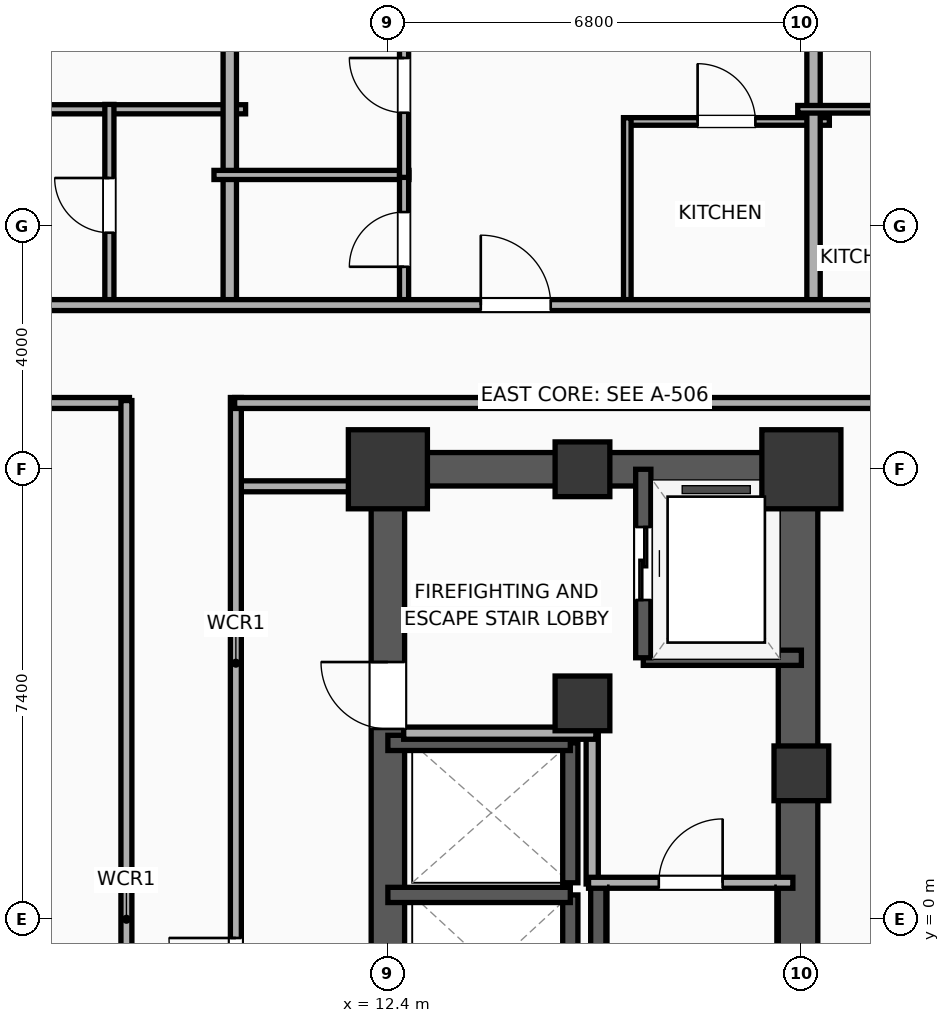
"""IFC4 building model, lengths in metres.
Left out: names, types, materials, properties, quantities, classifications, styles, units other than length and angle.
Written with IfcOpenShell. Run it as: python <this file> out.ifc"""

import sys

from ifc_helpers import new_model, si_unit, direction, frame, frame_2d, origin, origin_2d, place, context, subcontext, project, spatial, rectangle, extrude, element, fill, save


model = new_model("IFC4")
c1 = context("Model", 3, precision=1e-05, world=origin(), true_north=direction((0.0, 1.0)))
c2 = subcontext(c1, "Body", "Model", "MODEL_VIEW")
j1 = project(units=[si_unit("LENGTHUNIT", "METRE"), si_unit("PLANEANGLEUNIT", "RADIAN")], contexts=[c1])
p1 = place(None, origin())
s1 = spatial("IfcSite", under=j1, at=p1, CompositionType="ELEMENT")
p2 = place(p1, origin())
s2 = spatial("IfcBuilding", under=s1, at=p2, CompositionType="ELEMENT")
p3 = place(p2, frame((0.0, 0.0, 105.3)))
s3 = spatial("IfcBuildingStorey", under=s2, at=p3, CompositionType="ELEMENT", Elevation=105.3)
p4 = place(p3, frame((15.6, 3.55, 0.0), z_axis=(0.0, 0.0, 1.0), x_axis=(1.0, 0.0, 0.0)))
e1 = element("IfcColumn", 1, at=p4, inside=s3, PredefinedType="COLUMN", context=c2, shape_type="SweptSolid", body=[
    extrude(rectangle(XDim=0.9, YDim=0.9, at=origin_2d()), origin(), (0.0, 0.0, 1.0), 3.9),
])
p5 = place(p3, frame((12.4, 7.4, 0.0), z_axis=(0.0, 0.0, 1.0), x_axis=(1.0, 0.0, 0.0)))
e2 = element("IfcColumn", 2, at=p5, inside=s3, PredefinedType="COLUMN", context=c2, shape_type="SweptSolid", body=[
    extrude(rectangle(XDim=1.3, YDim=1.3, at=origin_2d()), origin(), (0.0, 0.0, 1.0), 3.9),
])
for number, where, z_axis, x_axis in (
    (3, (15.6, 7.4, 0.0), (0.0, 0.0, 1.0), (1.0, 0.0, 0.0)),
    (4, (19.2, 2.4, 0.0), (0.0, 0.0, 1.0), (1.0, 0.0, 0.0)),
):
    element("IfcColumn", number, at=place(p3, frame(where, z_axis=z_axis, x_axis=x_axis)), inside=s3, PredefinedType="COLUMN", context=c2, shape_type="SweptSolid", body=[
        extrude(rectangle(XDim=0.9, YDim=0.9, at=origin_2d()), origin(), (0.0, 0.0, 1.0), 3.9),
    ])
p6 = place(p3, frame((19.2, 7.4, 0.0), z_axis=(0.0, 0.0, 1.0), x_axis=(1.0, 0.0, 0.0)))
e5 = element("IfcColumn", 5, at=p6, inside=s3, PredefinedType="COLUMN", context=c2, shape_type="SweptSolid", body=[
    extrude(rectangle(XDim=1.3, YDim=1.3, at=origin_2d()), origin(), (0.0, 0.0, 1.0), 3.9),
])
p7 = place(p3, frame((12.125, 7.4, 0.0), z_axis=(0.0, 0.0, 1.0), x_axis=(1.0, 0.0, 0.0)))
e6 = element("IfcWall", 6, at=p7, inside=s3, PredefinedType="SHEAR", context=c2, shape_type="SweptSolid", body=[
    extrude(rectangle(XDim=7.35, YDim=0.55, at=frame_2d((3.675, 0.0))), origin(), (0.0, 0.0, 1.0), 3.65),
])
p8 = place(p3, frame((12.4, -7.4, 0.0), z_axis=(0.0, 0.0, 1.0), x_axis=(0.0, 1.0, 0.0)))
e7 = element("IfcWall", 7, at=p8, inside=s3, PredefinedType="SHEAR", context=c2, shape_type="SweptSolid", body=[
    extrude(rectangle(XDim=14.8, YDim=0.55, at=frame_2d((7.4, 0.0))), origin(), (0.0, 0.0, 1.0), 3.65),
])
p9 = place(p8, frame((0.85, 0.0, 0.0)))
e8 = element("IfcOpeningElement", 8, at=p9, cuts=e7, PredefinedType="OPENING", context=c2, shape_type="SweptSolid", body=[
    extrude(rectangle(XDim=1.1, YDim=2.05, at=frame_2d((0.55, 1.025))), frame((0.0, 0.285, 0.0), z_axis=(0.0, -1.0, 0.0), x_axis=(1.0, 0.0, 0.0)), (0.0, 0.0, 1.0), 0.57),
])
p10 = place(p8, frame((10.53, 0.0, 0.0)))
e9 = element("IfcOpeningElement", 9, at=p10, cuts=e7, PredefinedType="OPENING", context=c2, shape_type="SweptSolid", body=[
    extrude(rectangle(XDim=1.1, YDim=2.05, at=frame_2d((0.55, 1.025))), frame((0.0, 0.285, 0.0), z_axis=(0.0, -1.0, 0.0), x_axis=(1.0, 0.0, 0.0)), (0.0, 0.0, 1.0), 0.57),
])
p11 = place(p3, frame((19.145, -7.4, 0.0), z_axis=(0.0, 0.0, 1.0), x_axis=(0.0, 1.0, 0.0)))
e10 = element("IfcWall", 10, at=p11, inside=s3, PredefinedType="SHEAR", context=c2, shape_type="SweptSolid", body=[
    extrude(rectangle(XDim=14.8, YDim=0.65, at=frame_2d((7.4, 0.0))), origin(), (0.0, 0.0, 1.0), 3.65),
])
p12 = place(p3, frame((15.86, -7.085, 0.0), z_axis=(0.0, 0.0, 1.0), x_axis=(0.0, 1.0, 0.0)))
e11 = element("IfcWall", 11, at=p12, inside=s3, PredefinedType="SOLIDWALL", context=c2, shape_type="SweptSolid", body=[
    extrude(rectangle(XDim=7.685, YDim=0.25, at=frame_2d((3.843, 0.0))), origin(), (0.0, 0.0, 1.0), 3.65),
])
p13 = place(p3, frame((16.6, 4.3, 0.0), z_axis=(0.0, 0.0, 1.0), x_axis=(1.0, 0.0, 0.0)))
e12 = element("IfcWall", 12, at=p13, inside=s3, PredefinedType="SOLIDWALL", context=c2, shape_type="SweptSolid", body=[
    extrude(rectangle(XDim=2.6, YDim=0.25, at=frame_2d((1.3, 0.0))), origin(), (0.0, 0.0, 1.0), 3.65),
])
p14 = place(p3, frame((16.6, 7.4, 0.0), z_axis=(0.0, 0.0, 1.0), x_axis=(0.0, -1.0, 0.0)))
e13 = element("IfcWall", 13, at=p14, inside=s3, PredefinedType="SOLIDWALL", context=c2, shape_type="SweptSolid", body=[
    extrude(rectangle(XDim=3.1, YDim=0.25, at=frame_2d((1.55, 0.0))), origin(), (0.0, 0.0, 1.0), 3.65),
])
p15 = place(p14, frame((0.95, 0.0, 0.0)))
e14 = element("IfcOpeningElement", 14, at=p15, cuts=e13, PredefinedType="OPENING", context=c2, shape_type="SweptSolid", body=[
    extrude(rectangle(XDim=1.2, YDim=2.05, at=frame_2d((0.6, 1.025))), frame((0.0, 0.135, 0.0), z_axis=(0.0, -1.0, 0.0), x_axis=(1.0, 0.0, 0.0)), (0.0, 0.0, 1.0), 0.27),
])
p16 = place(p3, frame((15.4, -2.0, 0.0), z_axis=(0.0, 0.0, 1.0), x_axis=(0.0, 1.0, 0.0)))
e15 = element("IfcWall", 15, at=p16, inside=s3, PredefinedType="SOLIDWALL", context=c2, shape_type="SweptSolid", body=[
    extrude(rectangle(XDim=2.4, YDim=0.25, at=frame_2d((1.2, 0.0))), origin(), (0.0, 0.0, 1.0), 3.65),
])
p17 = place(p3, frame((15.4, 0.4, 0.0), z_axis=(0.0, 0.0, 1.0), x_axis=(-1.0, 0.0, 0.0)))
e16 = element("IfcWall", 16, at=p17, inside=s3, PredefinedType="SOLIDWALL", context=c2, shape_type="SweptSolid", body=[
    extrude(rectangle(XDim=3.0, YDim=0.25, at=frame_2d((1.5, 0.0))), origin(), (0.0, 0.0, 1.0), 3.65),
])
p18 = place(p3, frame((15.4, 0.6, 0.0), z_axis=(0.0, 0.0, 1.0), x_axis=(0.0, 1.0, 0.0)))
e17 = element("IfcWall", 17, at=p18, inside=s3, PredefinedType="SOLIDWALL", context=c2, shape_type="SweptSolid", body=[
    extrude(rectangle(XDim=2.3, YDim=0.25, at=frame_2d((1.15, 0.0))), origin(), (0.0, 0.0, 1.0), 3.65),
])
p19 = place(p3, frame((15.4, 2.9, 0.0), z_axis=(0.0, 0.0, 1.0), x_axis=(-1.0, 0.0, 0.0)))
e18 = element("IfcWall", 18, at=p19, inside=s3, PredefinedType="SOLIDWALL", context=c2, shape_type="SweptSolid", body=[
    extrude(rectangle(XDim=3.0, YDim=0.25, at=frame_2d((1.5, 0.0))), origin(), (0.0, 0.0, 1.0), 3.65),
])
p20 = place(p3, frame((15.76, 0.58, 0.0), z_axis=(0.0, 0.0, 1.0), x_axis=(0.0, 1.0, 0.0)))
e19 = element("IfcWall", 19, at=p20, inside=s3, PredefinedType="PARTITIONING", context=c2, shape_type="SweptSolid", body=[
    extrude(rectangle(XDim=2.52, YDim=0.2, at=frame_2d((1.26, 0.0))), origin(), (0.0, 0.0, 1.0), 3.65),
])
p21 = place(p3, frame((12.66, 3.06, 0.0), z_axis=(0.0, 0.0, 1.0), x_axis=(1.0, 0.0, 0.0)))
e20 = element("IfcWall", 20, at=p21, inside=s3, PredefinedType="PARTITIONING", context=c2, shape_type="SweptSolid", body=[
    extrude(rectangle(XDim=3.16, YDim=0.2, at=frame_2d((1.58, 0.0))), origin(), (0.0, 0.0, 1.0), 3.65),
])
p22 = place(p3, frame((15.7, 0.6, 0.0), z_axis=(0.0, 0.0, 1.0), x_axis=(1.0, 0.0, 0.0)))
e21 = element("IfcWall", 21, at=p22, inside=s3, PredefinedType="PARTITIONING", context=c2, shape_type="SweptSolid", body=[
    extrude(rectangle(XDim=3.36, YDim=0.18, at=frame_2d((1.68, 0.0))), origin(), (0.0, 0.0, 1.0), 3.65),
])
p23 = place(p22, frame((1.155, 0.0, 0.0)))
e22 = element("IfcOpeningElement", 22, at=p23, cuts=e21, PredefinedType="OPENING", context=c2, shape_type="SweptSolid", body=[
    extrude(rectangle(XDim=1.05, YDim=2.05, at=frame_2d((0.525, 1.025))), frame((0.0, 0.1, 0.0), z_axis=(0.0, -1.0, 0.0), x_axis=(1.0, 0.0, 0.0)), (0.0, 0.0, 1.0), 0.2),
])
p24 = place(p3, frame((9.88, 7.12, 0.0), z_axis=(0.0, 0.0, 1.0), x_axis=(1.0, 0.0, 0.0)))
e23 = element("IfcWall", 23, at=p24, inside=s3, PredefinedType="PARTITIONING", context=c2, shape_type="SweptSolid", body=[
    extrude(rectangle(XDim=2.27, YDim=0.18, at=frame_2d((1.135, 0.0))), origin(), (0.0, 0.0, 1.0), 3.65),
])
p25 = place(p3, frame((9.9, -8.58, 0.0), z_axis=(0.0, 0.0, 1.0), x_axis=(0.0, 1.0, 0.0)))
e24 = element("IfcWall", 24, at=p25, inside=s3, PredefinedType="PARTITIONING", context=c2, shape_type="SweptSolid", body=[
    extrude(rectangle(XDim=17.16, YDim=0.18, at=frame_2d((8.58, 0.0))), origin(), (0.0, 0.0, 1.0), 3.65),
])
p26 = place(p25, frame((7.172, 0.0, 0.0)))
e25 = element("IfcOpeningElement", 25, at=p26, cuts=e24, PredefinedType="OPENING", context=c2, shape_type="SweptSolid", body=[
    extrude(rectangle(XDim=1.1, YDim=2.05, at=frame_2d((0.55, 1.025))), frame((0.0, 0.1, 0.0), z_axis=(0.0, -1.0, 0.0), x_axis=(1.0, 0.0, 0.0)), (0.0, 0.0, 1.0), 0.2),
])
p27 = place(p3, frame((9.88, 8.49, 0.0), z_axis=(0.0, 0.0, 1.0), x_axis=(1.0, 0.0, 0.0)))
e26 = element("IfcWall", 26, at=p27, inside=s3, PredefinedType="PARTITIONING", context=c2, shape_type="SweptSolid", body=[
    extrude(rectangle(XDim=23.33, YDim=0.18, at=frame_2d((11.665, 0.0))), origin(), (0.0, 0.0, 1.0), 3.65),
])
p28 = place(p27, frame((18.115, 0.0, 0.0)))
e27 = element("IfcOpeningElement", 27, at=p28, cuts=e26, PredefinedType="OPENING", context=c2, shape_type="SweptSolid", body=[
    extrude(rectangle(XDim=1.15, YDim=2.05, at=frame_2d((0.575, 1.025))), frame((0.0, 0.1, 0.0), z_axis=(0.0, -1.0, 0.0), x_axis=(1.0, 0.0, 0.0)), (0.0, 0.0, 1.0), 0.2),
])
p29 = place(p3, frame((-8.15, 8.49, 0.0), z_axis=(0.0, 0.0, 1.0), x_axis=(1.0, 0.0, 0.0)))
e28 = element("IfcWall", 28, at=p29, inside=s3, PredefinedType="PARTITIONING", context=c2, shape_type="SweptSolid", body=[
    extrude(rectangle(XDim=16.3, YDim=0.18, at=frame_2d((8.15, 0.0))), origin(), (0.0, 0.0, 1.0), 3.65),
])
p30 = place(p29, frame((8.49, 0.0, 0.0)))
e29 = element("IfcOpeningElement", 29, at=p30, cuts=e28, PredefinedType="OPENING", context=c2, shape_type="SweptSolid", body=[
    extrude(rectangle(XDim=0.95, YDim=2.05, at=frame_2d((0.475, 1.025))), frame((0.0, 0.1, 0.0), z_axis=(0.0, -1.0, 0.0), x_axis=(1.0, 0.0, 0.0)), (0.0, 0.0, 1.0), 0.2),
])
p31 = place(p3, frame((8.1, -8.53, 0.0), z_axis=(0.0, 0.0, 1.0), x_axis=(0.0, 1.0, 0.0)))
e30 = element("IfcWall", 30, at=p31, inside=s3, PredefinedType="PARTITIONING", context=c2, shape_type="SweptSolid", body=[
    extrude(rectangle(XDim=17.06, YDim=0.18, at=frame_2d((8.53, 0.0))), origin(), (0.0, 0.0, 1.0), 3.65),
])
p32 = place(p3, frame((6.27, 13.32, 0.0), z_axis=(0.0, 0.0, 1.0), x_axis=(1.0, 0.0, 0.0)))
e31 = element("IfcWall", 31, at=p32, inside=s3, PredefinedType="PLUMBINGWALL", context=c2, shape_type="SweptSolid", body=[
    extrude(rectangle(XDim=3.79, YDim=0.15, at=frame_2d((1.895, 0.0))), origin(), (0.0, 0.0, 1.0), 3.65),
])
p33 = place(p3, frame((7.82, 10.08, 0.0), z_axis=(0.0, 0.0, 1.0), x_axis=(0.0, 1.0, 0.0)))
e32 = element("IfcWall", 32, at=p33, inside=s3, PredefinedType="PLUMBINGWALL", context=c2, shape_type="SweptSolid", body=[
    extrude(rectangle(XDim=3.32, YDim=0.15, at=frame_2d((1.66, 0.0))), origin(), (0.0, 0.0, 1.0), 3.65),
])
p34 = place(p33, frame((1.21, 0.0, 0.0)))
e33 = element("IfcOpeningElement", 33, at=p34, cuts=e32, PredefinedType="OPENING", context=c2, shape_type="SweptSolid", body=[
    extrude(rectangle(XDim=0.9, YDim=2.05, at=frame_2d((0.45, 1.025))), frame((0.0, 0.085, 0.0), z_axis=(0.0, -1.0, 0.0), x_axis=(1.0, 0.0, 0.0)), (0.0, 0.0, 1.0), 0.17),
])
p35 = place(p3, frame((9.8, 10.02, 0.0), z_axis=(0.0, 0.0, 1.0), x_axis=(0.0, 1.0, 0.0)))
e34 = element("IfcWall", 34, at=p35, inside=s3, PredefinedType="PARTITIONING", context=c2, shape_type="SweptSolid", body=[
    extrude(rectangle(XDim=11.59, YDim=0.22, at=frame_2d((5.795, 0.0))), origin(), (0.0, 0.0, 1.0), 3.65),
])
p36 = place(p3, frame((9.54, 12.24, 0.0), z_axis=(0.0, 0.0, 1.0), x_axis=(1.0, 0.0, 0.0)))
e35 = element("IfcWall", 35, at=p36, inside=s3, PredefinedType="PLUMBINGWALL", context=c2, shape_type="SweptSolid", body=[
    extrude(rectangle(XDim=3.206, YDim=0.15, at=frame_2d((1.603, 0.0))), origin(), (0.0, 0.0, 1.0), 3.65),
])
p37 = place(p3, frame((12.666, 10.08, 0.0), z_axis=(0.0, 0.0, 1.0), x_axis=(0.0, 1.0, 0.0)))
e36 = element("IfcWall", 36, at=p37, inside=s3, PredefinedType="PLUMBINGWALL", context=c2, shape_type="SweptSolid", body=[
    extrude(rectangle(XDim=2.2, YDim=0.15, at=frame_2d((1.1, 0.0))), origin(), (0.0, 0.0, 1.0), 3.65),
])
p38 = place(p37, frame((0.65, 0.0, 0.0)))
e37 = element("IfcOpeningElement", 37, at=p38, cuts=e36, PredefinedType="OPENING", context=c2, shape_type="SweptSolid", body=[
    extrude(rectangle(XDim=0.9, YDim=2.05, at=frame_2d((0.45, 1.025))), frame((0.0, 0.085, 0.0), z_axis=(0.0, -1.0, 0.0), x_axis=(1.0, 0.0, 0.0)), (0.0, 0.0, 1.0), 0.17),
])
p39 = place(p3, frame((12.666, 12.2, 0.0), z_axis=(0.0, 0.0, 1.0), x_axis=(0.0, 1.0, 0.0)))
e38 = element("IfcWall", 38, at=p39, inside=s3, PredefinedType="PLUMBINGWALL", context=c2, shape_type="SweptSolid", body=[
    extrude(rectangle(XDim=9.458, YDim=0.15, at=frame_2d((4.729, 0.0))), origin(), (0.0, 0.0, 1.0), 3.65),
])
p40 = place(p39, frame((1.063, 0.0, 0.0)))
e39 = element("IfcOpeningElement", 39, at=p40, cuts=e38, PredefinedType="OPENING", context=c2, shape_type="SweptSolid", body=[
    extrude(rectangle(XDim=0.9, YDim=2.05, at=frame_2d((0.45, 1.025))), frame((0.0, 0.085, 0.0), z_axis=(0.0, -1.0, 0.0), x_axis=(1.0, 0.0, 0.0)), (0.0, 0.0, 1.0), 0.17),
])
p41 = place(p3, frame((16.277, 13.12, 0.0), z_axis=(0.0, 0.0, 1.0), x_axis=(1.0, 0.0, 0.0)))
e40 = element("IfcWall", 40, at=p41, inside=s3, PredefinedType="PARTITIONING", context=c2, shape_type="SweptSolid", body=[
    extrude(rectangle(XDim=3.383, YDim=0.125, at=frame_2d((1.691, 0.0))), origin(), (0.0, 0.0, 1.0), 3.65),
])
p42 = place(p41, frame((1.217, 0.0, 0.0)))
e41 = element("IfcOpeningElement", 41, at=p42, cuts=e40, PredefinedType="OPENING", context=c2, shape_type="SweptSolid", body=[
    extrude(rectangle(XDim=0.95, YDim=2.05, at=frame_2d((0.475, 1.025))), frame((0.0, 0.073, 0.0), z_axis=(0.0, -1.0, 0.0), x_axis=(1.0, 0.0, 0.0)), (0.0, 0.0, 1.0), 0.145),
])
p43 = place(p3, frame((16.337, 10.08, 0.0), z_axis=(0.0, 0.0, 1.0), x_axis=(0.0, 1.0, 0.0)))
e42 = element("IfcWall", 42, at=p43, inside=s3, PredefinedType="PARTITIONING", context=c2, shape_type="SweptSolid", body=[
    extrude(rectangle(XDim=3.1, YDim=0.125, at=frame_2d((1.55, 0.0))), origin(), (0.0, 0.0, 1.0), 3.65),
])
p44 = place(p3, frame((19.4, 10.02, 0.0), z_axis=(0.0, 0.0, 1.0), x_axis=(0.0, 1.0, 0.0)))
e43 = element("IfcWall", 43, at=p44, inside=s3, PredefinedType="PARTITIONING", context=c2, shape_type="SweptSolid", body=[
    extrude(rectangle(XDim=11.59, YDim=0.22, at=frame_2d((5.795, 0.0))), origin(), (0.0, 0.0, 1.0), 3.65),
])
p45 = place(p3, frame((19.14, 13.32, 0.0), z_axis=(0.0, 0.0, 1.0), x_axis=(1.0, 0.0, 0.0)))
e44 = element("IfcWall", 44, at=p45, inside=s3, PredefinedType="PARTITIONING", context=c2, shape_type="SweptSolid", body=[
    extrude(rectangle(XDim=2.69, YDim=0.125, at=frame_2d((1.345, 0.0))), origin(), (0.0, 0.0, 1.0), 3.65),
])
p46 = place(p3, frame((-29.21, 10.1, 0.0), z_axis=(0.0, 0.0, 1.0), x_axis=(1.0, 0.0, 0.0)))
e45 = element("IfcWall", 45, at=p46, inside=s3, PredefinedType="PARTITIONING", context=c2, shape_type="SweptSolid", body=[
    extrude(rectangle(XDim=62.42, YDim=0.18, at=frame_2d((31.21, 0.0))), origin(), (0.0, 0.0, 1.0), 3.65),
])
p47 = place(p46, frame((4.906, 0.0, 0.0)))
e46 = element("IfcOpeningElement", 46, at=p47, cuts=e45, PredefinedType="OPENING", context=c2, shape_type="SweptSolid", body=[
    extrude(rectangle(XDim=1.15, YDim=2.05, at=frame_2d((0.575, 1.025))), frame((0.0, 0.1, 0.0), z_axis=(0.0, -1.0, 0.0), x_axis=(1.0, 0.0, 0.0)), (0.0, 0.0, 1.0), 0.2),
])
p48 = place(p46, frame((14.812, 0.0, 0.0)))
e47 = element("IfcOpeningElement", 47, at=p48, cuts=e45, PredefinedType="OPENING", context=c2, shape_type="SweptSolid", body=[
    extrude(rectangle(XDim=1.15, YDim=2.05, at=frame_2d((0.575, 1.025))), frame((0.0, 0.1, 0.0), z_axis=(0.0, -1.0, 0.0), x_axis=(1.0, 0.0, 0.0)), (0.0, 0.0, 1.0), 0.2),
])
p49 = place(p46, frame((24.406, 0.0, 0.0)))
e48 = element("IfcOpeningElement", 48, at=p49, cuts=e45, PredefinedType="OPENING", context=c2, shape_type="SweptSolid", body=[
    extrude(rectangle(XDim=1.15, YDim=2.05, at=frame_2d((0.575, 1.025))), frame((0.0, 0.1, 0.0), z_axis=(0.0, -1.0, 0.0), x_axis=(1.0, 0.0, 0.0)), (0.0, 0.0, 1.0), 0.2),
])
p50 = place(p46, frame((33.981, 0.0, 0.0)))
e49 = element("IfcOpeningElement", 49, at=p50, cuts=e45, PredefinedType="OPENING", context=c2, shape_type="SweptSolid", body=[
    extrude(rectangle(XDim=1.15, YDim=2.05, at=frame_2d((0.575, 1.025))), frame((0.0, 0.1, 0.0), z_axis=(0.0, -1.0, 0.0), x_axis=(1.0, 0.0, 0.0)), (0.0, 0.0, 1.0), 0.2),
])
p51 = place(p46, frame((43.138, 0.0, 0.0)))
e50 = element("IfcOpeningElement", 50, at=p51, cuts=e45, PredefinedType="OPENING", context=c2, shape_type="SweptSolid", body=[
    extrude(rectangle(XDim=1.15, YDim=2.05, at=frame_2d((0.575, 1.025))), frame((0.0, 0.1, 0.0), z_axis=(0.0, -1.0, 0.0), x_axis=(1.0, 0.0, 0.0)), (0.0, 0.0, 1.0), 0.2),
])
p52 = place(p46, frame((51.777, 0.0, 0.0)))
e51 = element("IfcOpeningElement", 51, at=p52, cuts=e45, PredefinedType="OPENING", context=c2, shape_type="SweptSolid", body=[
    extrude(rectangle(XDim=0.9, YDim=2.05, at=frame_2d((0.45, 1.025))), frame((0.0, 0.1, 0.0), z_axis=(0.0, -1.0, 0.0), x_axis=(1.0, 0.0, 0.0)), (0.0, 0.0, 1.0), 0.2),
])
p53 = place(p46, frame((58.718, 0.0, 0.0)))
e52 = element("IfcOpeningElement", 52, at=p53, cuts=e45, PredefinedType="OPENING", context=c2, shape_type="SweptSolid", body=[
    extrude(rectangle(XDim=0.9, YDim=2.05, at=frame_2d((0.45, 1.025))), frame((0.0, 0.1, 0.0), z_axis=(0.0, -1.0, 0.0), x_axis=(1.0, 0.0, 0.0)), (0.0, 0.0, 1.0), 0.2),
])
p54 = place(p15, origin())
e53 = element("IfcDoor", 53, at=p54, inside=s3, OperationType="SLIDING_TO_LEFT", PredefinedType="DOOR", context=c2, shape_type="SweptSolid", body=[
    extrude(rectangle(XDim=1.2, YDim=2.05, at=frame_2d((0.6, 1.025))), frame((0.0, 0.025, 0.0), z_axis=(0.0, -1.0, 0.0), x_axis=(1.0, 0.0, 0.0)), (0.0, 0.0, 1.0), 0.05),
])
fill(e14, e53)
p55 = place(p23, origin())
e54 = element("IfcDoor", 54, at=p55, inside=s3, OperationType="SINGLE_SWING_RIGHT", PredefinedType="DOOR", context=c2, shape_type="SweptSolid", body=[
    extrude(rectangle(XDim=1.05, YDim=2.05, at=frame_2d((0.525, 1.025))), frame((0.0, 0.025, 0.0), z_axis=(0.0, -1.0, 0.0), x_axis=(1.0, 0.0, 0.0)), (0.0, 0.0, 1.0), 0.05),
])
fill(e22, e54)
p56 = place(p26, origin())
e55 = element("IfcDoor", 55, at=p56, inside=s3, OperationType="SINGLE_SWING_RIGHT", PredefinedType="DOOR", context=c2, shape_type="SweptSolid", body=[
    extrude(rectangle(XDim=1.1, YDim=2.05, at=frame_2d((0.55, 1.025))), frame((0.0, 0.025, 0.0), z_axis=(0.0, -1.0, 0.0), x_axis=(1.0, 0.0, 0.0)), (0.0, 0.0, 1.0), 0.05),
])
fill(e25, e55)
p57 = place(p34, origin())
e56 = element("IfcDoor", 56, at=p57, inside=s3, OperationType="SINGLE_SWING_RIGHT", PredefinedType="DOOR", context=c2, shape_type="SweptSolid", body=[
    extrude(rectangle(XDim=0.9, YDim=2.05, at=frame_2d((0.45, 1.025))), frame((0.0, 0.025, 0.0), z_axis=(0.0, -1.0, 0.0), x_axis=(1.0, 0.0, 0.0)), (0.0, 0.0, 1.0), 0.05),
])
fill(e33, e56)
p58 = place(p38, origin())
e57 = element("IfcDoor", 57, at=p58, inside=s3, OperationType="SINGLE_SWING_LEFT", PredefinedType="DOOR", context=c2, shape_type="SweptSolid", body=[
    extrude(rectangle(XDim=0.9, YDim=2.05, at=frame_2d((0.45, 1.025))), frame((0.0, 0.025, 0.0), z_axis=(0.0, -1.0, 0.0), x_axis=(1.0, 0.0, 0.0)), (0.0, 0.0, 1.0), 0.05),
])
fill(e37, e57)
p59 = place(p40, origin())
e58 = element("IfcDoor", 58, at=p59, inside=s3, OperationType="SINGLE_SWING_RIGHT", PredefinedType="DOOR", context=c2, shape_type="SweptSolid", body=[
    extrude(rectangle(XDim=0.9, YDim=2.05, at=frame_2d((0.45, 1.025))), frame((0.0, 0.025, 0.0), z_axis=(0.0, -1.0, 0.0), x_axis=(1.0, 0.0, 0.0)), (0.0, 0.0, 1.0), 0.05),
])
fill(e39, e58)
p60 = place(p42, origin())
e59 = element("IfcDoor", 59, at=p60, inside=s3, OperationType="SINGLE_SWING_LEFT", PredefinedType="DOOR", context=c2, shape_type="SweptSolid", body=[
    extrude(rectangle(XDim=0.95, YDim=2.05, at=frame_2d((0.475, 1.025))), frame((0.0, 0.025, 0.0), z_axis=(0.0, -1.0, 0.0), x_axis=(1.0, 0.0, 0.0)), (0.0, 0.0, 1.0), 0.05),
])
fill(e41, e59)
p61 = place(p51, origin())
e60 = element("IfcDoor", 60, at=p61, inside=s3, OperationType="SINGLE_SWING_LEFT", PredefinedType="DOOR", context=c2, shape_type="SweptSolid", body=[
    extrude(rectangle(XDim=1.15, YDim=2.05, at=frame_2d((0.575, 1.025))), frame((0.0, 0.025, 0.0), z_axis=(0.0, -1.0, 0.0), x_axis=(1.0, 0.0, 0.0)), (0.0, 0.0, 1.0), 0.05),
])
fill(e50, e60)
p62 = place(p10, origin())
e61 = element("IfcDoor", 61, at=p62, inside=s3, OperationType="SINGLE_SWING_RIGHT", PredefinedType="DOOR", context=c2, shape_type="SweptSolid", body=[
    extrude(rectangle(XDim=1.1, YDim=2.05, at=frame_2d((0.55, 1.025))), frame((0.0, 0.025, 0.0), z_axis=(0.0, -1.0, 0.0), x_axis=(1.0, 0.0, 0.0)), (0.0, 0.0, 1.0), 0.05),
])
fill(e9, e61)
save(model, sys.argv[1])
